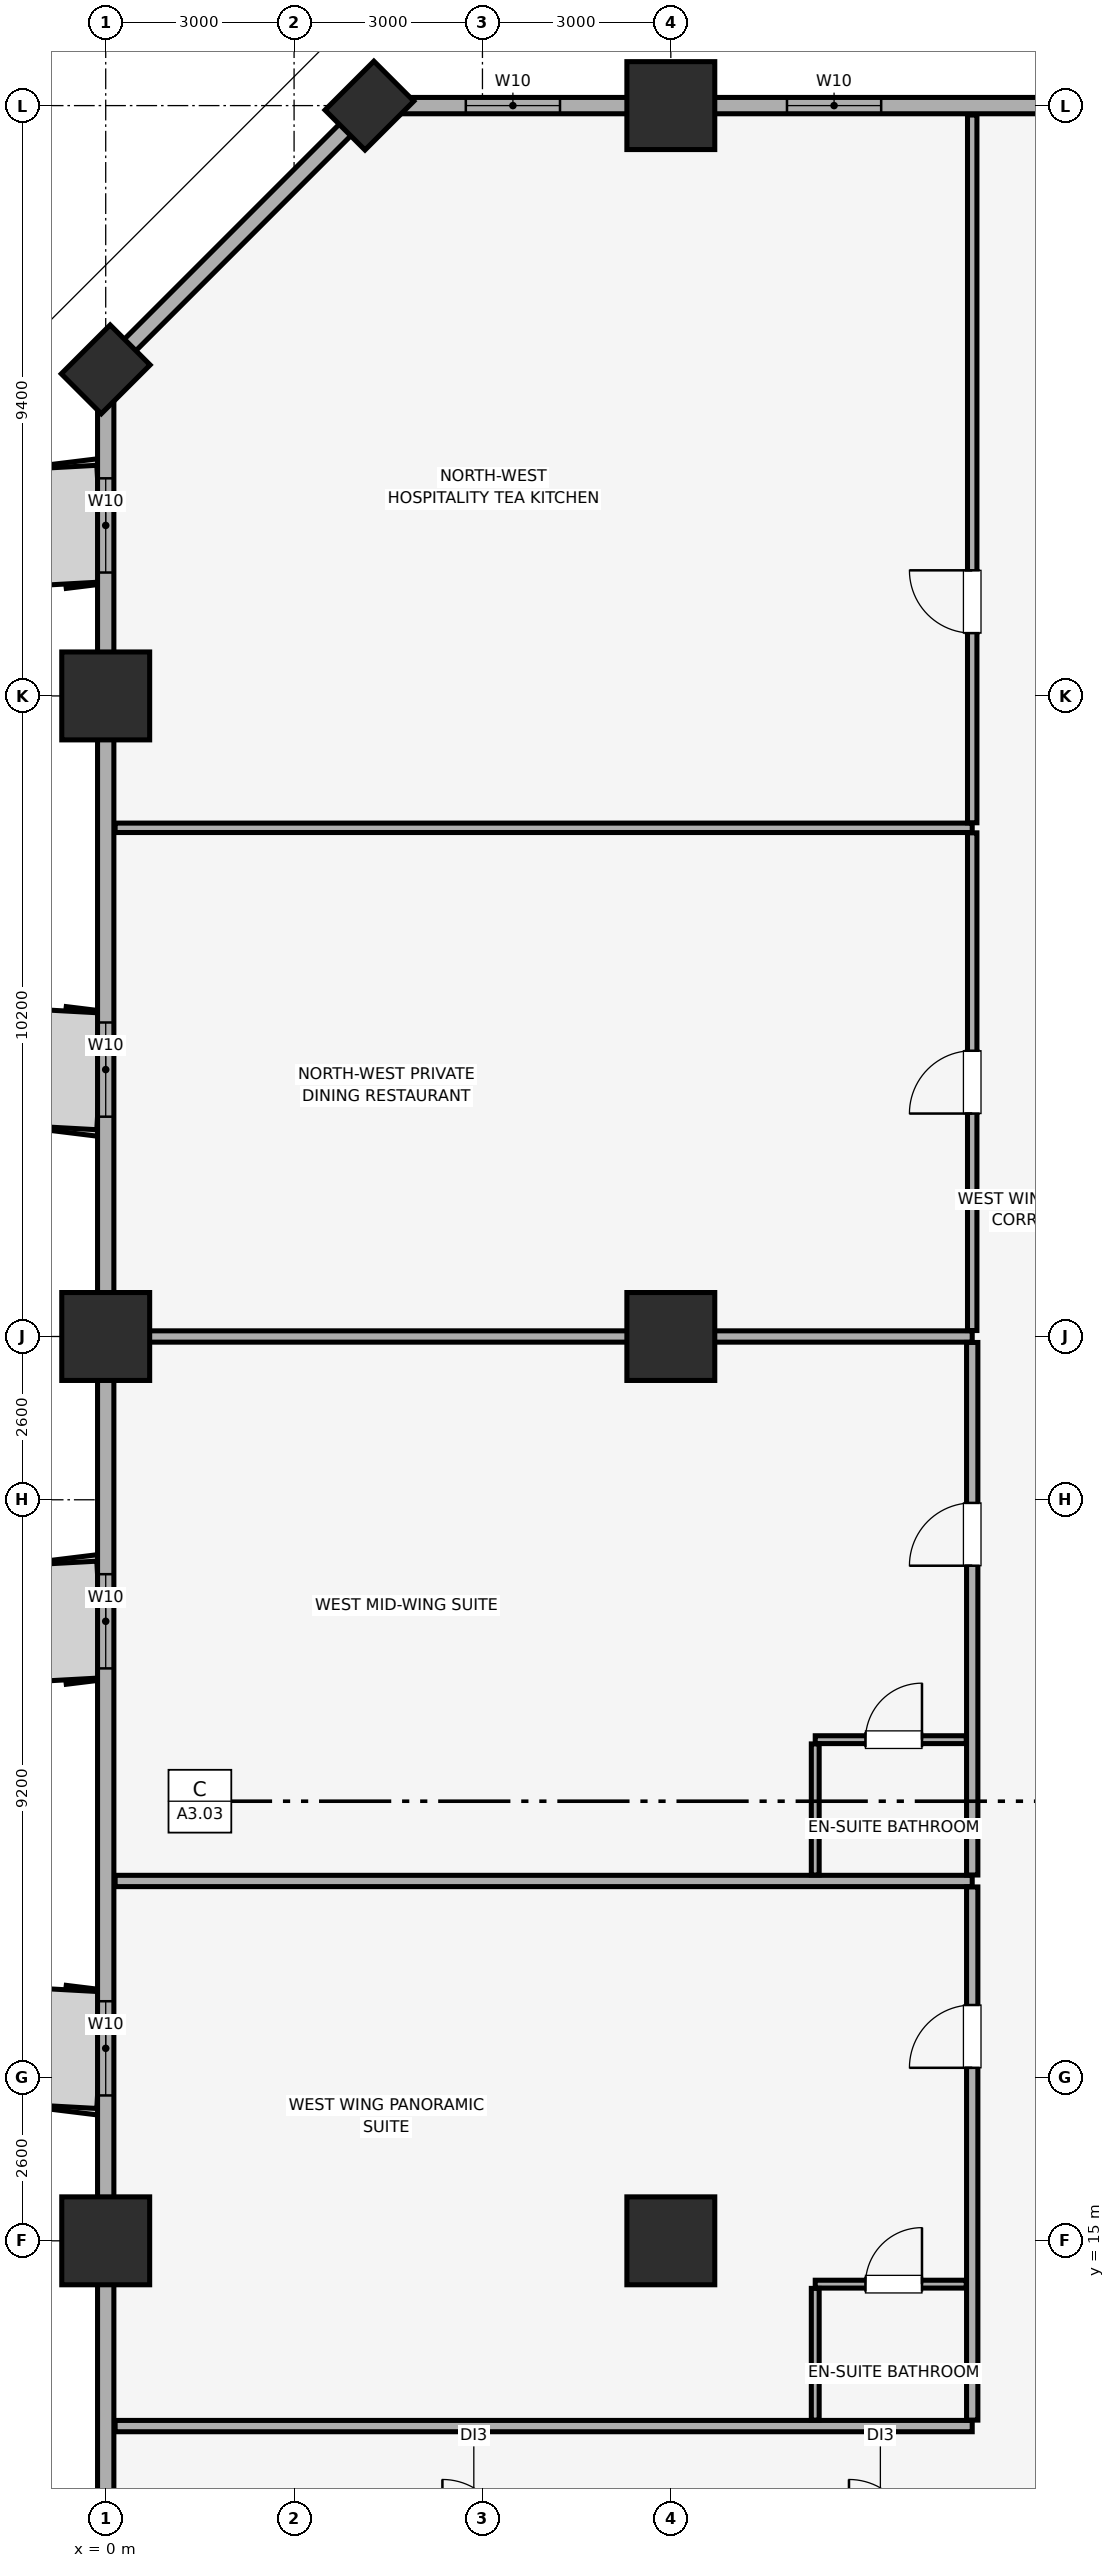
"""IFC4 building model, lengths in metres.
Left out: names, types, materials, properties, quantities, classifications, styles, units other than length and angle.
Written with IfcOpenShell. Run it as: python <this file> out.ifc"""

import sys

from ifc_helpers import new_model, si_unit, direction, frame, frame_2d, origin, origin_2d, place, context, subcontext, project, spatial, rectangle, extrude, element, fill, save


model = new_model("IFC4")
c1 = context("Model", 3, precision=1e-05, world=origin(), true_north=direction((0.0, 1.0)))
c2 = subcontext(c1, "Body", "Model", "MODEL_VIEW")
j1 = project(units=[si_unit("LENGTHUNIT", "METRE"), si_unit("PLANEANGLEUNIT", "RADIAN")], contexts=[c1])
p1 = place(None, origin())
s1 = spatial("IfcSite", under=j1, at=p1, CompositionType="ELEMENT")
p2 = place(p1, origin())
s2 = spatial("IfcBuilding", under=s1, at=p2, CompositionType="ELEMENT")
p3 = place(p2, frame((0.0, 0.0, 46.4)))
s3 = spatial("IfcBuildingStorey", under=s2, at=p3, CompositionType="ELEMENT", Elevation=46.4)
for number, where, z_axis, x_axis in (
    (1, (0.0, 15.0, 0.0), (0.0, 0.0, 1.0), (1.0, 0.0, 0.0)),
    (2, (0.0, 29.4, 0.0), (0.0, 0.0, 1.0), (1.0, 0.0, 0.0)),
    (3, (0.0, 39.6, 0.0), (0.0, 0.0, 1.0), (1.0, 0.0, 0.0)),
):
    element("IfcColumn", number, at=place(p3, frame(where, z_axis=z_axis, x_axis=x_axis)), inside=s3, PredefinedType="COLUMN", context=c2, shape_type="SweptSolid", body=[
        extrude(rectangle(XDim=1.4, YDim=1.4, at=origin_2d()), origin(), (0.0, 0.0, 1.0), 3.51),
    ])
for number, where, z_axis, x_axis in (
    (4, (4.2, 49.0, 0.0), (0.0, 0.0, 1.0), (0.707, 0.707, 0.0)),
    (5, (0.0, 44.8, 0.0), (0.0, 0.0, 1.0), (0.707, 0.707, 0.0)),
):
    element("IfcColumn", number, at=place(p3, frame(where, z_axis=z_axis, x_axis=x_axis)), inside=s3, PredefinedType="PILASTER", context=c2, shape_type="SweptSolid", body=[
        extrude(rectangle(XDim=1.1, YDim=0.9, at=origin_2d()), origin(), (0.0, 0.0, 1.0), 3.51),
    ])
for number, where, z_axis, x_axis in (
    (6, (9.0, 15.0, 0.0), (0.0, 0.0, 1.0), (1.0, 0.0, 0.0)),
    (7, (9.0, 29.4, 0.0), (0.0, 0.0, 1.0), (1.0, 0.0, 0.0)),
    (8, (9.0, 49.0, 0.0), (0.0, 0.0, 1.0), (1.0, 0.0, 0.0)),
):
    element("IfcColumn", number, at=place(p3, frame(where, z_axis=z_axis, x_axis=x_axis)), inside=s3, PredefinedType="COLUMN", context=c2, shape_type="SweptSolid", body=[
        extrude(rectangle(XDim=1.4, YDim=1.4, at=origin_2d()), origin(), (0.0, 0.0, 1.0), 3.51),
    ])
p4 = place(p3, frame((79.8, 49.0, 0.0), z_axis=(0.0, 0.0, 1.0), x_axis=(-1.0, 0.0, 0.0)))
e9 = element("IfcWall", 9, at=p4, inside=s3, PredefinedType="SOLIDWALL", context=c2, shape_type="SweptSolid", body=[
    extrude(rectangle(XDim=75.6, YDim=0.26, at=frame_2d((37.8, 0.0))), origin(), (0.0, 0.0, 1.0), 2.56),
])
p5 = place(p4, frame((72.565, 0.0, 0.85)))
e10 = element("IfcOpeningElement", 10, at=p5, cuts=e9, PredefinedType="OPENING", context=c2, shape_type="SweptSolid", body=[
    extrude(rectangle(XDim=1.5, YDim=1.4, at=frame_2d((0.75, 0.7))), frame((0.0, 0.14, 0.0), z_axis=(0.0, -1.0, 0.0), x_axis=(1.0, 0.0, 0.0)), (0.0, 0.0, 1.0), 0.28),
])
p6 = place(p4, frame((67.45, 0.0, 0.85)))
e11 = element("IfcOpeningElement", 11, at=p6, cuts=e9, PredefinedType="OPENING", context=c2, shape_type="SweptSolid", body=[
    extrude(rectangle(XDim=1.5, YDim=1.4, at=frame_2d((0.75, 0.7))), frame((0.0, 0.14, 0.0), z_axis=(0.0, -1.0, 0.0), x_axis=(1.0, 0.0, 0.0)), (0.0, 0.0, 1.0), 0.28),
])
p7 = place(p4, frame((6.65, 0.0, 0.85)))
e12 = element("IfcOpeningElement", 12, at=p7, cuts=e9, PredefinedType="OPENING", context=c2, shape_type="SweptSolid", body=[
    extrude(rectangle(XDim=1.5, YDim=1.4, at=frame_2d((0.75, 0.7))), frame((0.0, 0.14, 0.0), z_axis=(0.0, -1.0, 0.0), x_axis=(1.0, 0.0, 0.0)), (0.0, 0.0, 1.0), 0.28),
])
p8 = place(p4, frame((1.535, 0.0, 0.85)))
e13 = element("IfcOpeningElement", 13, at=p8, cuts=e9, PredefinedType="OPENING", context=c2, shape_type="SweptSolid", body=[
    extrude(rectangle(XDim=1.5, YDim=1.4, at=frame_2d((0.75, 0.7))), frame((0.0, 0.14, 0.0), z_axis=(0.0, -1.0, 0.0), x_axis=(1.0, 0.0, 0.0)), (0.0, 0.0, 1.0), 0.28),
])
p9 = place(p4, frame((51.365, 0.0, 0.9)))
e14 = element("IfcOpeningElement", 14, at=p9, cuts=e9, PredefinedType="OPENING", context=c2, shape_type="SweptSolid", body=[
    extrude(rectangle(XDim=1.5, YDim=1.4, at=frame_2d((0.75, 0.7))), frame((0.0, 0.14, 0.0), z_axis=(0.0, -1.0, 0.0), x_axis=(1.0, 0.0, 0.0)), (0.0, 0.0, 1.0), 0.28),
])
p10 = place(p4, frame((44.55, 0.0, 0.9)))
e15 = element("IfcOpeningElement", 15, at=p10, cuts=e9, PredefinedType="OPENING", context=c2, shape_type="SweptSolid", body=[
    extrude(rectangle(XDim=1.5, YDim=1.4, at=frame_2d((0.75, 0.7))), frame((0.0, 0.14, 0.0), z_axis=(0.0, -1.0, 0.0), x_axis=(1.0, 0.0, 0.0)), (0.0, 0.0, 1.0), 0.28),
])
p11 = place(p4, frame((28.1, 0.0, 0.9)))
e16 = element("IfcOpeningElement", 16, at=p11, cuts=e9, PredefinedType="OPENING", context=c2, shape_type="SweptSolid", body=[
    extrude(rectangle(XDim=1.5, YDim=1.4, at=frame_2d((0.75, 0.7))), frame((0.0, 0.14, 0.0), z_axis=(0.0, -1.0, 0.0), x_axis=(1.0, 0.0, 0.0)), (0.0, 0.0, 1.0), 0.28),
])
p12 = place(p4, frame((23.485, 0.0, 0.9)))
e17 = element("IfcOpeningElement", 17, at=p12, cuts=e9, PredefinedType="OPENING", context=c2, shape_type="SweptSolid", body=[
    extrude(rectangle(XDim=1.5, YDim=1.4, at=frame_2d((0.75, 0.7))), frame((0.0, 0.14, 0.0), z_axis=(0.0, -1.0, 0.0), x_axis=(1.0, 0.0, 0.0)), (0.0, 0.0, 1.0), 0.28),
])
p13 = place(p3, frame((4.2, 49.0, 0.0), z_axis=(0.0, 0.0, 1.0), x_axis=(-0.707106781187, -0.707106781187, 0.0)))
e18 = element("IfcWall", 18, at=p13, inside=s3, PredefinedType="SOLIDWALL", context=c2, shape_type="SweptSolid", body=[
    extrude(rectangle(XDim=5.94, YDim=0.26, at=frame_2d((2.97, 0.0))), origin(), (0.0, 0.0, 1.0), 2.56),
])
p14 = place(p3, frame((0.0, 44.8, 0.0), z_axis=(0.0, 0.0, 1.0), x_axis=(0.0, -1.0, 0.0)))
e19 = element("IfcWall", 19, at=p14, inside=s3, PredefinedType="SOLIDWALL", context=c2, shape_type="SweptSolid", body=[
    extrude(rectangle(XDim=40.6, YDim=0.26, at=frame_2d((20.3, 0.0))), origin(), (0.0, 0.0, 1.0), 2.56),
])
p15 = place(p14, frame((35.25, 0.0, 0.85)))
e20 = element("IfcOpeningElement", 20, at=p15, cuts=e19, PredefinedType="OPENING", context=c2, shape_type="SweptSolid", body=[
    extrude(rectangle(XDim=1.5, YDim=1.4, at=frame_2d((0.75, 0.7))), frame((0.0, 0.14, 0.0), z_axis=(0.0, -1.0, 0.0), x_axis=(1.0, 0.0, 0.0)), (0.0, 0.0, 1.0), 0.28),
])
p16 = place(p14, frame((25.985, 0.0, 0.85)))
e21 = element("IfcOpeningElement", 21, at=p16, cuts=e19, PredefinedType="OPENING", context=c2, shape_type="SweptSolid", body=[
    extrude(rectangle(XDim=1.5, YDim=1.4, at=frame_2d((0.75, 0.7))), frame((0.0, 0.14, 0.0), z_axis=(0.0, -1.0, 0.0), x_axis=(1.0, 0.0, 0.0)), (0.0, 0.0, 1.0), 0.28),
])
p17 = place(p14, frame((19.185, 0.0, 0.85)))
e22 = element("IfcOpeningElement", 22, at=p17, cuts=e19, PredefinedType="OPENING", context=c2, shape_type="SweptSolid", body=[
    extrude(rectangle(XDim=1.5, YDim=1.4, at=frame_2d((0.75, 0.7))), frame((0.0, 0.14, 0.0), z_axis=(0.0, -1.0, 0.0), x_axis=(1.0, 0.0, 0.0)), (0.0, 0.0, 1.0), 0.28),
])
p18 = place(p14, frame((10.4, 0.0, 0.85)))
e23 = element("IfcOpeningElement", 23, at=p18, cuts=e19, PredefinedType="OPENING", context=c2, shape_type="SweptSolid", body=[
    extrude(rectangle(XDim=1.5, YDim=1.4, at=frame_2d((0.75, 0.7))), frame((0.0, 0.14, 0.0), z_axis=(0.0, -1.0, 0.0), x_axis=(1.0, 0.0, 0.0)), (0.0, 0.0, 1.0), 0.28),
])
p19 = place(p14, frame((1.735, 0.0, 0.85)))
e24 = element("IfcOpeningElement", 24, at=p19, cuts=e19, PredefinedType="OPENING", context=c2, shape_type="SweptSolid", body=[
    extrude(rectangle(XDim=1.5, YDim=1.4, at=frame_2d((0.75, 0.7))), frame((0.0, 0.14, 0.0), z_axis=(0.0, -1.0, 0.0), x_axis=(1.0, 0.0, 0.0)), (0.0, 0.0, 1.0), 0.28),
])
for number, where, z_axis, x_axis in (
    (25, (0.15, 12.05, 0.0), (0.0, 0.0, 1.0), (1.0, 0.0, 0.0)),
    (26, (0.15, 20.73, 0.0), (0.0, 0.0, 1.0), (1.0, 0.0, 0.0)),
):
    element("IfcWall", number, at=place(p3, frame(where, z_axis=z_axis, x_axis=x_axis)), inside=s3, PredefinedType="PARTITIONING", context=c2, shape_type="SweptSolid", body=[
        extrude(rectangle(XDim=13.65, YDim=0.18, at=frame_2d((6.825, 0.0))), origin(), (0.0, 0.0, 1.0), 3.51),
    ])
p20 = place(p3, frame((13.8, 12.145, 0.0), z_axis=(0.0, 0.0, 1.0), x_axis=(0.0, 1.0, 0.0)))
e27 = element("IfcWall", 27, at=p20, inside=s3, PredefinedType="PARTITIONING", context=c2, shape_type="SweptSolid", body=[
    extrude(rectangle(XDim=8.49, YDim=0.18, at=frame_2d((4.245, 0.0))), origin(), (0.0, 0.0, 1.0), 3.51),
])
p21 = place(p20, frame((5.61, 0.0, 0.0)))
e28 = element("IfcOpeningElement", 28, at=p21, cuts=e27, PredefinedType="OPENING", context=c2, shape_type="SweptSolid", body=[
    extrude(rectangle(XDim=1.0, YDim=2.15, at=frame_2d((0.5, 1.075))), frame((0.0, 0.1, 0.0), z_axis=(0.0, -1.0, 0.0), x_axis=(1.0, 0.0, 0.0)), (0.0, 0.0, 1.0), 0.2),
])
p22 = place(p3, frame((11.3, 14.31, 0.0), z_axis=(0.0, 0.0, 1.0), x_axis=(1.0, 0.0, 0.0)))
e29 = element("IfcWall", 29, at=p22, inside=s3, PredefinedType="PARTITIONING", context=c2, shape_type="SweptSolid", body=[
    extrude(rectangle(XDim=2.405, YDim=0.125, at=frame_2d((1.203, 0.0))), origin(), (0.0, 0.0, 1.0), 3.51),
])
p23 = place(p22, frame((0.8, 0.0, 0.0)))
e30 = element("IfcOpeningElement", 30, at=p23, cuts=e29, PredefinedType="OPENING", context=c2, shape_type="SweptSolid", body=[
    extrude(rectangle(XDim=0.9, YDim=2.1, at=frame_2d((0.45, 1.05))), frame((0.0, 0.073, 0.0), z_axis=(0.0, -1.0, 0.0), x_axis=(1.0, 0.0, 0.0)), (0.0, 0.0, 1.0), 0.145),
])
p24 = place(p3, frame((11.3, 12.145, 0.0), z_axis=(0.0, 0.0, 1.0), x_axis=(0.0, 1.0, 0.0)))
e31 = element("IfcWall", 31, at=p24, inside=s3, PredefinedType="PARTITIONING", context=c2, shape_type="SweptSolid", body=[
    extrude(rectangle(XDim=2.097, YDim=0.125, at=frame_2d((1.049, 0.0))), origin(), (0.0, 0.0, 1.0), 3.51),
])
p25 = place(p3, frame((0.15, 29.4, 0.0), z_axis=(0.0, 0.0, 1.0), x_axis=(1.0, 0.0, 0.0)))
e32 = element("IfcWall", 32, at=p25, inside=s3, PredefinedType="PARTITIONING", context=c2, shape_type="SweptSolid", body=[
    extrude(rectangle(XDim=13.65, YDim=0.18, at=frame_2d((6.825, 0.0))), origin(), (0.0, 0.0, 1.0), 2.86),
])
p26 = place(p3, frame((13.8, 20.825, 0.0), z_axis=(0.0, 0.0, 1.0), x_axis=(0.0, 1.0, 0.0)))
e33 = element("IfcWall", 33, at=p26, inside=s3, PredefinedType="PARTITIONING", context=c2, shape_type="SweptSolid", body=[
    extrude(rectangle(XDim=8.48, YDim=0.18, at=frame_2d((4.24, 0.0))), origin(), (0.0, 0.0, 1.0), 3.51),
])
p27 = place(p26, frame((4.925, 0.0, 0.0)))
e34 = element("IfcOpeningElement", 34, at=p27, cuts=e33, PredefinedType="OPENING", context=c2, shape_type="SweptSolid", body=[
    extrude(rectangle(XDim=1.0, YDim=2.15, at=frame_2d((0.5, 1.075))), frame((0.0, 0.1, 0.0), z_axis=(0.0, -1.0, 0.0), x_axis=(1.0, 0.0, 0.0)), (0.0, 0.0, 1.0), 0.2),
])
p28 = place(p3, frame((11.3, 22.98, 0.0), z_axis=(0.0, 0.0, 1.0), x_axis=(1.0, 0.0, 0.0)))
e35 = element("IfcWall", 35, at=p28, inside=s3, PredefinedType="PARTITIONING", context=c2, shape_type="SweptSolid", body=[
    extrude(rectangle(XDim=2.405, YDim=0.125, at=frame_2d((1.203, 0.0))), origin(), (0.0, 0.0, 1.0), 3.51),
])
p29 = place(p28, frame((0.8, 0.0, 0.0)))
e36 = element("IfcOpeningElement", 36, at=p29, cuts=e35, PredefinedType="OPENING", context=c2, shape_type="SweptSolid", body=[
    extrude(rectangle(XDim=0.9, YDim=2.1, at=frame_2d((0.45, 1.05))), frame((0.0, 0.073, 0.0), z_axis=(0.0, -1.0, 0.0), x_axis=(1.0, 0.0, 0.0)), (0.0, 0.0, 1.0), 0.145),
])
p30 = place(p3, frame((11.3, 20.825, 0.0), z_axis=(0.0, 0.0, 1.0), x_axis=(0.0, 1.0, 0.0)))
e37 = element("IfcWall", 37, at=p30, inside=s3, PredefinedType="PARTITIONING", context=c2, shape_type="SweptSolid", body=[
    extrude(rectangle(XDim=2.088, YDim=0.125, at=frame_2d((1.044, 0.0))), origin(), (0.0, 0.0, 1.0), 3.51),
])
p31 = place(p3, frame((0.15, 37.5, 0.0), z_axis=(0.0, 0.0, 1.0), x_axis=(1.0, 0.0, 0.0)))
e38 = element("IfcWall", 38, at=p31, inside=s3, PredefinedType="PARTITIONING", context=c2, shape_type="SweptSolid", body=[
    extrude(rectangle(XDim=13.65, YDim=0.15, at=frame_2d((6.825, 0.0))), origin(), (0.0, 0.0, 1.0), 3.51),
])
p32 = place(p3, frame((13.8, 29.495, 0.0), z_axis=(0.0, 0.0, 1.0), x_axis=(0.0, 1.0, 0.0)))
e39 = element("IfcWall", 39, at=p32, inside=s3, PredefinedType="PARTITIONING", context=c2, shape_type="SweptSolid", body=[
    extrude(rectangle(XDim=7.925, YDim=0.15, at=frame_2d((3.962, 0.0))), origin(), (0.0, 0.0, 1.0), 3.51),
])
p33 = place(p32, frame((3.455, 0.0, 0.0)))
e40 = element("IfcOpeningElement", 40, at=p33, cuts=e39, PredefinedType="OPENING", context=c2, shape_type="SweptSolid", body=[
    extrude(rectangle(XDim=1.0, YDim=2.15, at=frame_2d((0.5, 1.075))), frame((0.0, 0.085, 0.0), z_axis=(0.0, -1.0, 0.0), x_axis=(1.0, 0.0, 0.0)), (0.0, 0.0, 1.0), 0.17),
])
p34 = place(p3, frame((13.8, 37.58, 0.0), z_axis=(0.0, 0.0, 1.0), x_axis=(0.0, 1.0, 0.0)))
e41 = element("IfcWall", 41, at=p34, inside=s3, PredefinedType="PARTITIONING", context=c2, shape_type="SweptSolid", body=[
    extrude(rectangle(XDim=11.27, YDim=0.15, at=frame_2d((5.635, 0.0))), origin(), (0.0, 0.0, 1.0), 3.51),
])
p35 = place(p34, frame((3.02, 0.0, 0.0)))
e42 = element("IfcOpeningElement", 42, at=p35, cuts=e41, PredefinedType="OPENING", context=c2, shape_type="SweptSolid", body=[
    extrude(rectangle(XDim=1.0, YDim=2.15, at=frame_2d((0.5, 1.075))), frame((0.0, 0.085, 0.0), z_axis=(0.0, -1.0, 0.0), x_axis=(1.0, 0.0, 0.0)), (0.0, 0.0, 1.0), 0.17),
])
p36 = place(p16, origin())
e43 = element("IfcWindow", 43, at=p36, inside=s3, PartitioningType="SINGLE_PANEL", PredefinedType="WINDOW", context=c2, shape_type="SweptSolid", body=[
    extrude(rectangle(XDim=1.5, YDim=1.4, at=frame_2d((0.75, 0.7))), frame((0.0, 0.03, 0.0), z_axis=(0.0, -1.0, 0.0), x_axis=(1.0, 0.0, 0.0)), (0.0, 0.0, 1.0), 0.06),
])
fill(e21, e43)
p37 = place(p17, origin())
e44 = element("IfcWindow", 44, at=p37, inside=s3, PartitioningType="SINGLE_PANEL", PredefinedType="WINDOW", context=c2, shape_type="SweptSolid", body=[
    extrude(rectangle(XDim=1.5, YDim=1.4, at=frame_2d((0.75, 0.7))), frame((0.0, 0.03, 0.0), z_axis=(0.0, -1.0, 0.0), x_axis=(1.0, 0.0, 0.0)), (0.0, 0.0, 1.0), 0.06),
])
fill(e22, e44)
p38 = place(p18, origin())
e45 = element("IfcWindow", 45, at=p38, inside=s3, PartitioningType="SINGLE_PANEL", PredefinedType="WINDOW", context=c2, shape_type="SweptSolid", body=[
    extrude(rectangle(XDim=1.5, YDim=1.4, at=frame_2d((0.75, 0.7))), frame((0.0, 0.03, 0.0), z_axis=(0.0, -1.0, 0.0), x_axis=(1.0, 0.0, 0.0)), (0.0, 0.0, 1.0), 0.06),
])
fill(e23, e45)
p39 = place(p19, origin())
e46 = element("IfcWindow", 46, at=p39, inside=s3, PartitioningType="SINGLE_PANEL", PredefinedType="WINDOW", context=c2, shape_type="SweptSolid", body=[
    extrude(rectangle(XDim=1.5, YDim=1.4, at=frame_2d((0.75, 0.7))), frame((0.0, 0.03, 0.0), z_axis=(0.0, -1.0, 0.0), x_axis=(1.0, 0.0, 0.0)), (0.0, 0.0, 1.0), 0.06),
])
fill(e24, e46)
p40 = place(p5, origin())
e47 = element("IfcWindow", 47, at=p40, inside=s3, PartitioningType="SINGLE_PANEL", PredefinedType="WINDOW", context=c2, shape_type="SweptSolid", body=[
    extrude(rectangle(XDim=1.5, YDim=1.4, at=frame_2d((0.75, 0.7))), frame((0.0, 0.03, 0.0), z_axis=(0.0, -1.0, 0.0), x_axis=(1.0, 0.0, 0.0)), (0.0, 0.0, 1.0), 0.06),
])
fill(e10, e47)
p41 = place(p6, origin())
e48 = element("IfcWindow", 48, at=p41, inside=s3, PartitioningType="SINGLE_PANEL", PredefinedType="WINDOW", context=c2, shape_type="SweptSolid", body=[
    extrude(rectangle(XDim=1.5, YDim=1.4, at=frame_2d((0.75, 0.7))), frame((0.0, 0.03, 0.0), z_axis=(0.0, -1.0, 0.0), x_axis=(1.0, 0.0, 0.0)), (0.0, 0.0, 1.0), 0.06),
])
fill(e11, e48)
p42 = place(p21, origin())
e49 = element("IfcDoor", 49, at=p42, inside=s3, OperationType="SINGLE_SWING_LEFT", PredefinedType="DOOR", context=c2, shape_type="SweptSolid", body=[
    extrude(rectangle(XDim=1.0, YDim=2.15, at=frame_2d((0.5, 1.075))), frame((0.0, 0.025, 0.0), z_axis=(0.0, -1.0, 0.0), x_axis=(1.0, 0.0, 0.0)), (0.0, 0.0, 1.0), 0.05),
])
fill(e28, e49)
p43 = place(p23, origin())
e50 = element("IfcDoor", 50, at=p43, inside=s3, OperationType="SINGLE_SWING_RIGHT", PredefinedType="DOOR", context=c2, shape_type="SweptSolid", body=[
    extrude(rectangle(XDim=0.9, YDim=2.1, at=frame_2d((0.45, 1.05))), frame((0.0, 0.025, 0.0), z_axis=(0.0, -1.0, 0.0), x_axis=(1.0, 0.0, 0.0)), (0.0, 0.0, 1.0), 0.05),
])
fill(e30, e50)
p44 = place(p27, origin())
e51 = element("IfcDoor", 51, at=p44, inside=s3, OperationType="SINGLE_SWING_LEFT", PredefinedType="DOOR", context=c2, shape_type="SweptSolid", body=[
    extrude(rectangle(XDim=1.0, YDim=2.15, at=frame_2d((0.5, 1.075))), frame((0.0, 0.025, 0.0), z_axis=(0.0, -1.0, 0.0), x_axis=(1.0, 0.0, 0.0)), (0.0, 0.0, 1.0), 0.05),
])
fill(e34, e51)
p45 = place(p29, origin())
e52 = element("IfcDoor", 52, at=p45, inside=s3, OperationType="SINGLE_SWING_RIGHT", PredefinedType="DOOR", context=c2, shape_type="SweptSolid", body=[
    extrude(rectangle(XDim=0.9, YDim=2.1, at=frame_2d((0.45, 1.05))), frame((0.0, 0.025, 0.0), z_axis=(0.0, -1.0, 0.0), x_axis=(1.0, 0.0, 0.0)), (0.0, 0.0, 1.0), 0.05),
])
fill(e36, e52)
p46 = place(p33, origin())
e53 = element("IfcDoor", 53, at=p46, inside=s3, OperationType="SINGLE_SWING_LEFT", PredefinedType="DOOR", context=c2, shape_type="SweptSolid", body=[
    extrude(rectangle(XDim=1.0, YDim=2.15, at=frame_2d((0.5, 1.075))), frame((0.0, 0.025, 0.0), z_axis=(0.0, -1.0, 0.0), x_axis=(1.0, 0.0, 0.0)), (0.0, 0.0, 1.0), 0.05),
])
fill(e40, e53)
p47 = place(p35, origin())
e54 = element("IfcDoor", 54, at=p47, inside=s3, OperationType="SINGLE_SWING_RIGHT", PredefinedType="DOOR", context=c2, shape_type="SweptSolid", body=[
    extrude(rectangle(XDim=1.0, YDim=2.15, at=frame_2d((0.5, 1.075))), frame((0.0, 0.025, 0.0), z_axis=(0.0, -1.0, 0.0), x_axis=(1.0, 0.0, 0.0)), (0.0, 0.0, 1.0), 0.05),
])
fill(e42, e54)
save(model, sys.argv[1])
